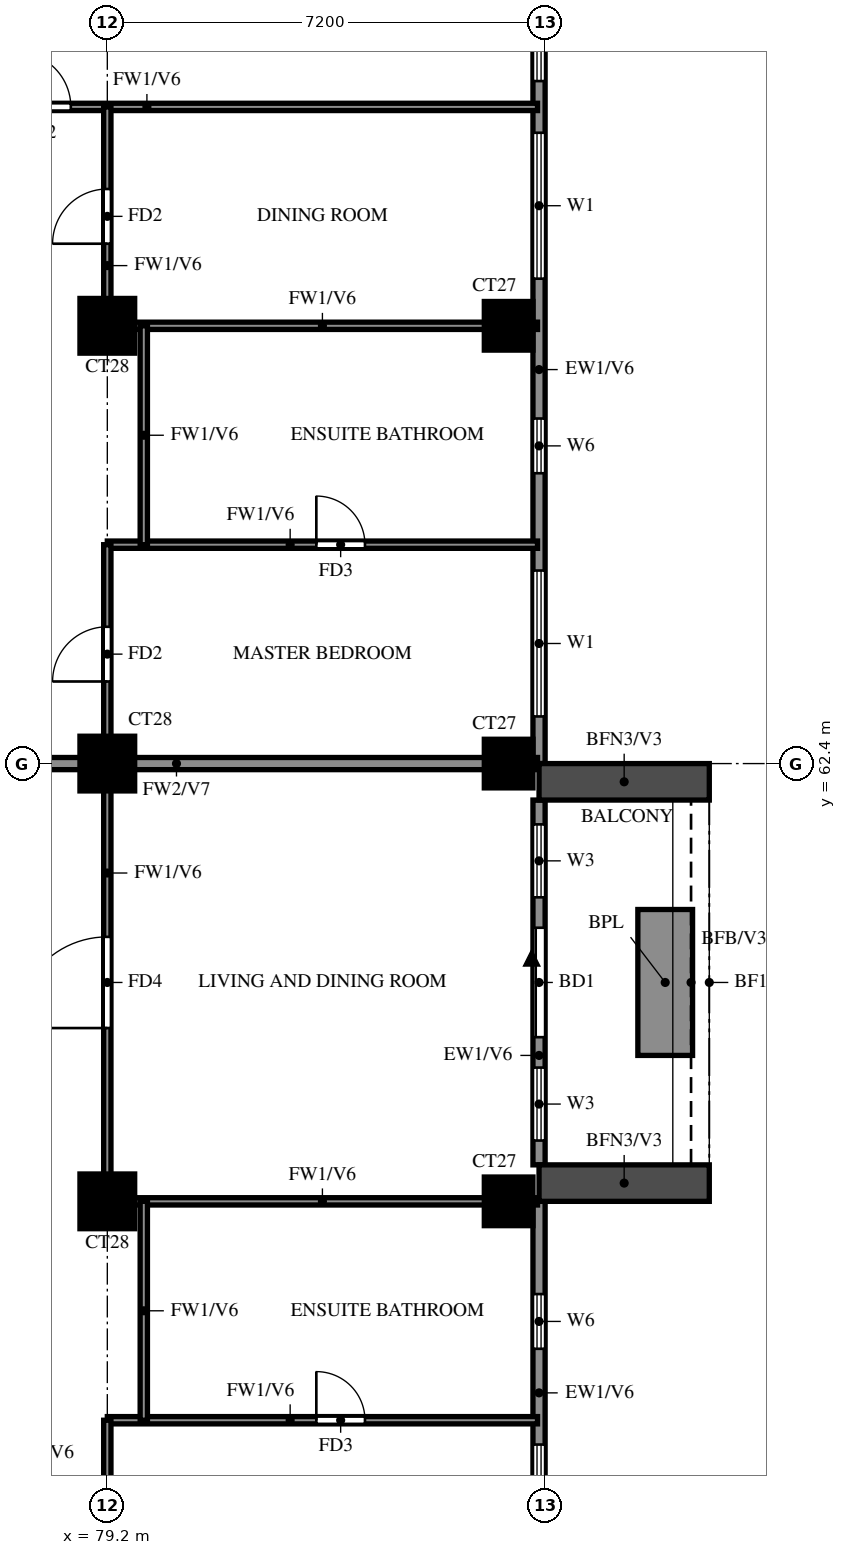
"""IFC4 building model, lengths in metres.
Left out: names, types, materials, properties, quantities, classifications, styles, units other than length and angle.
Written with IfcOpenShell. Run it as: python <this file> out.ifc"""

import sys

from ifc_helpers import new_model, si_unit, direction, frame, frame_2d, origin, origin_2d, place, context, subcontext, project, spatial, rectangle, extrude, source, transform, mapped, element, fill, save


model = new_model("IFC4")
c1 = context("Model", 3, precision=1e-05, world=origin(), true_north=direction((0.0, 1.0)))
c2 = subcontext(c1, "Body", "Model", "MODEL_VIEW")
j1 = project(units=[si_unit("LENGTHUNIT", "METRE"), si_unit("PLANEANGLEUNIT", "RADIAN")], contexts=[c1])
p1 = place(None, origin())
s1 = spatial("IfcSite", under=j1, at=p1, CompositionType="ELEMENT")
p2 = place(p1, origin())
s2 = spatial("IfcBuilding", under=s1, at=p2, CompositionType="ELEMENT")
p3 = place(p2, frame((0.0, 0.0, 202.5)))
s3 = spatial("IfcBuildingStorey", under=s2, at=p3, CompositionType="ELEMENT", Elevation=202.5)
m1 = source(origin(), c2, "Body", "SweptSolid", [
    extrude(rectangle(XDim=0.9, YDim=0.9, at=origin_2d()), origin(), (0.0, 0.0, 1.0), 3.1),
])
p4 = place(p3, frame((79.2, 55.2, 0.0), z_axis=(0.0, 0.0, 1.0), x_axis=(1.0, 0.0, 0.0)))
e1 = element("IfcColumn", 1, at=p4, inside=s3, PredefinedType="COLUMN", context=c2, shape_type="MappedRepresentation", body=[
    mapped(m1, transform((0.0, 0.0, 0.0))),
])
m2 = source(origin(), c2, "Body", "SweptSolid", [
    extrude(rectangle(XDim=0.8, YDim=0.8, at=origin_2d()), origin(), (0.0, 0.0, 1.0), 3.1),
])
p5 = place(p3, frame((85.8, 55.2, 0.0), z_axis=(0.0, 0.0, 1.0), x_axis=(1.0, 0.0, 0.0)))
e2 = element("IfcColumn", 2, at=p5, inside=s3, PredefinedType="COLUMN", context=c2, shape_type="MappedRepresentation", body=[
    mapped(m2, transform((0.0, 0.0, 0.0))),
])
p6 = place(p3, frame((79.2, 62.4, 0.0), z_axis=(0.0, 0.0, 1.0), x_axis=(1.0, 0.0, 0.0)))
e3 = element("IfcColumn", 3, at=p6, inside=s3, PredefinedType="COLUMN", context=c2, shape_type="MappedRepresentation", body=[
    mapped(m1, transform((0.0, 0.0, 0.0))),
])
p7 = place(p3, frame((85.8, 62.4, 0.0), z_axis=(0.0, 0.0, 1.0), x_axis=(1.0, 0.0, 0.0)))
e4 = element("IfcColumn", 4, at=p7, inside=s3, PredefinedType="COLUMN", context=c2, shape_type="MappedRepresentation", body=[
    mapped(m2, transform((0.0, 0.0, 0.0))),
])
p8 = place(p3, frame((79.2, 69.6, 0.0), z_axis=(0.0, 0.0, 1.0), x_axis=(1.0, 0.0, 0.0)))
e5 = element("IfcColumn", 5, at=p8, inside=s3, PredefinedType="COLUMN", context=c2, shape_type="MappedRepresentation", body=[
    mapped(m1, transform((0.0, 0.0, 0.0))),
])
p9 = place(p3, frame((85.8, 69.6, 0.0), z_axis=(0.0, 0.0, 1.0), x_axis=(1.0, 0.0, 0.0)))
e6 = element("IfcColumn", 6, at=p9, inside=s3, PredefinedType="COLUMN", context=c2, shape_type="MappedRepresentation", body=[
    mapped(m2, transform((0.0, 0.0, 0.0))),
])
p10 = place(p3, frame((86.3, 48.2, 0.0), z_axis=(0.0, 0.0, 1.0), x_axis=(0.0, 1.0, 0.0)))
e7 = element("IfcWall", 7, at=p10, inside=s3, PredefinedType="SOLIDWALL", context=c2, shape_type="SweptSolid", body=[
    extrude(rectangle(XDim=7.0, YDim=0.2, at=frame_2d((3.5, 0.0))), origin(), (0.0, 0.0, 1.0), 3.1),
])
p11 = place(p10, frame((0.6, 0.0, 0.6)))
e8 = element("IfcOpeningElement", 8, at=p11, cuts=e7, PredefinedType="OPENING", context=c2, shape_type="SweptSolid", body=[
    extrude(rectangle(XDim=2.4, YDim=2.4, at=frame_2d((1.2, 1.2))), frame((0.0, 0.11, 0.0), z_axis=(0.0, -1.0, 0.0), x_axis=(1.0, 0.0, 0.0)), (0.0, 0.0, 1.0), 0.22),
])
p12 = place(p10, frame((4.575, 0.0, 1.5)))
e9 = element("IfcOpeningElement", 9, at=p12, cuts=e7, PredefinedType="OPENING", context=c2, shape_type="SweptSolid", body=[
    extrude(rectangle(XDim=0.9, YDim=0.9, at=frame_2d((0.45, 0.45))), frame((0.0, 0.11, 0.0), z_axis=(0.0, -1.0, 0.0), x_axis=(1.0, 0.0, 0.0)), (0.0, 0.0, 1.0), 0.22),
])
p13 = place(p3, frame((86.3, 55.8, 0.0), z_axis=(0.0, 0.0, 1.0), x_axis=(0.0, 1.0, 0.0)))
e10 = element("IfcWall", 10, at=p13, inside=s3, PredefinedType="SOLIDWALL", context=c2, shape_type="SweptSolid", body=[
    extrude(rectangle(XDim=6.0, YDim=0.2, at=frame_2d((3.0, 0.0))), origin(), (0.0, 0.0, 1.0), 3.1),
])
p14 = place(p13, frame((2.1, 0.0, 0.0)))
e11 = element("IfcOpeningElement", 11, at=p14, cuts=e10, PredefinedType="OPENING", context=c2, shape_type="SweptSolid", body=[
    extrude(rectangle(XDim=1.8, YDim=2.4, at=frame_2d((0.9, 1.2))), frame((0.0, 0.11, 0.0), z_axis=(0.0, -1.0, 0.0), x_axis=(1.0, 0.0, 0.0)), (0.0, 0.0, 1.0), 0.22),
])
p15 = place(p13, frame((0.4, 0.0, 0.6)))
e12 = element("IfcOpeningElement", 12, at=p15, cuts=e10, PredefinedType="OPENING", context=c2, shape_type="SweptSolid", body=[
    extrude(rectangle(XDim=1.2, YDim=2.4, at=frame_2d((0.6, 1.2))), frame((0.0, 0.11, 0.0), z_axis=(0.0, -1.0, 0.0), x_axis=(1.0, 0.0, 0.0)), (0.0, 0.0, 1.0), 0.22),
])
p16 = place(p13, frame((4.4, 0.0, 0.6)))
e13 = element("IfcOpeningElement", 13, at=p16, cuts=e10, PredefinedType="OPENING", context=c2, shape_type="SweptSolid", body=[
    extrude(rectangle(XDim=1.2, YDim=2.4, at=frame_2d((0.6, 1.2))), frame((0.0, 0.11, 0.0), z_axis=(0.0, -1.0, 0.0), x_axis=(1.0, 0.0, 0.0)), (0.0, 0.0, 1.0), 0.22),
])
p17 = place(p3, frame((86.3, 62.4, 0.0), z_axis=(0.0, 0.0, 1.0), x_axis=(0.0, 1.0, 0.0)))
e14 = element("IfcWall", 14, at=p17, inside=s3, PredefinedType="SOLIDWALL", context=c2, shape_type="SweptSolid", body=[
    extrude(rectangle(XDim=14.4, YDim=0.2, at=frame_2d((7.2, 0.0))), origin(), (0.0, 0.0, 1.0), 3.1),
])
p18 = place(p17, frame((0.775, 0.0, 0.6)))
e15 = element("IfcOpeningElement", 15, at=p18, cuts=e14, PredefinedType="OPENING", context=c2, shape_type="SweptSolid", body=[
    extrude(rectangle(XDim=2.4, YDim=2.4, at=frame_2d((1.2, 1.2))), frame((0.0, 0.11, 0.0), z_axis=(0.0, -1.0, 0.0), x_axis=(1.0, 0.0, 0.0)), (0.0, 0.0, 1.0), 0.22),
])
p19 = place(p17, frame((4.775, 0.0, 1.5)))
e16 = element("IfcOpeningElement", 16, at=p19, cuts=e14, PredefinedType="OPENING", context=c2, shape_type="SweptSolid", body=[
    extrude(rectangle(XDim=0.9, YDim=0.9, at=frame_2d((0.45, 0.45))), frame((0.0, 0.11, 0.0), z_axis=(0.0, -1.0, 0.0), x_axis=(1.0, 0.0, 0.0)), (0.0, 0.0, 1.0), 0.22),
])
p20 = place(p17, frame((7.975, 0.0, 0.6)))
e17 = element("IfcOpeningElement", 17, at=p20, cuts=e14, PredefinedType="OPENING", context=c2, shape_type="SweptSolid", body=[
    extrude(rectangle(XDim=2.4, YDim=2.4, at=frame_2d((1.2, 1.2))), frame((0.0, 0.11, 0.0), z_axis=(0.0, -1.0, 0.0), x_axis=(1.0, 0.0, 0.0)), (0.0, 0.0, 1.0), 0.22),
])
p21 = place(p17, frame((11.225, 0.0, 0.6)))
e18 = element("IfcOpeningElement", 18, at=p21, cuts=e14, PredefinedType="OPENING", context=c2, shape_type="SweptSolid", body=[
    extrude(rectangle(XDim=2.4, YDim=2.4, at=frame_2d((1.2, 1.2))), frame((0.0, 0.11, 0.0), z_axis=(0.0, -1.0, 0.0), x_axis=(1.0, 0.0, 0.0)), (0.0, 0.0, 1.0), 0.22),
])
for number, where, z_axis, x_axis in (
    (19, (86.3, 55.5, 0.0), (0.0, 0.0, 1.0), (1.0, 0.0, 0.0)),
    (20, (86.3, 62.1, 0.0), (0.0, 0.0, 1.0), (1.0, 0.0, 0.0)),
):
    element("IfcWall", number, at=place(p3, frame(where, z_axis=z_axis, x_axis=x_axis)), inside=s3, PredefinedType="SOLIDWALL", context=c2, shape_type="SweptSolid", body=[
        extrude(rectangle(XDim=2.8, YDim=0.6, at=frame_2d((1.4, 0.0))), origin(), (0.0, 0.0, 1.0), 2.75),
    ])
p22 = place(p3, frame((88.375, 57.6, 0.0), z_axis=(0.0, 0.0, 1.0), x_axis=(0.0, 1.0, 0.0)))
e21 = element("IfcWall", 21, at=p22, inside=s3, PredefinedType="SOLIDWALL", context=c2, shape_type="SweptSolid", body=[
    extrude(rectangle(XDim=2.4, YDim=0.9, at=frame_2d((1.2, 0.0))), origin(), (0.0, 0.0, 1.0), 0.9),
])
p23 = place(p3, frame((74.4, 62.4, 0.0), z_axis=(0.0, 0.0, 1.0), x_axis=(1.0, 0.0, 0.0)))
e22 = element("IfcWall", 22, at=p23, inside=s3, PredefinedType="SOLIDWALL", context=c2, shape_type="SweptSolid", body=[
    extrude(rectangle(XDim=11.875, YDim=0.2, at=frame_2d((5.938, 0.0))), origin(), (0.0, 0.0, 1.0), 3.1),
])
p24 = place(p3, frame((79.2, 51.6, 0.0), z_axis=(0.0, 0.0, 1.0), x_axis=(1.0, 0.0, 0.0)))
e23 = element("IfcWall", 23, at=p24, inside=s3, PredefinedType="PARTITIONING", context=c2, shape_type="SweptSolid", body=[
    extrude(rectangle(XDim=7.075, YDim=0.12, at=frame_2d((3.538, 0.0))), origin(), (0.0, 0.0, 1.0), 3.1),
])
p25 = place(p24, frame((3.438, 0.0, 0.0)))
e24 = element("IfcOpeningElement", 24, at=p25, cuts=e23, PredefinedType="OPENING", context=c2, shape_type="SweptSolid", body=[
    extrude(rectangle(XDim=0.8, YDim=2.1, at=frame_2d((0.4, 1.05))), frame((0.0, 0.07, 0.0), z_axis=(0.0, -1.0, 0.0), x_axis=(1.0, 0.0, 0.0)), (0.0, 0.0, 1.0), 0.14),
])
p26 = place(p3, frame((79.2, 55.2, 0.0), z_axis=(0.0, 0.0, 1.0), x_axis=(1.0, 0.0, 0.0)))
e25 = element("IfcWall", 25, at=p26, inside=s3, PredefinedType="PARTITIONING", context=c2, shape_type="SweptSolid", body=[
    extrude(rectangle(XDim=7.075, YDim=0.12, at=frame_2d((3.538, 0.0))), origin(), (0.0, 0.0, 1.0), 3.1),
])
p27 = place(p3, frame((79.2, 66.0, 0.0), z_axis=(0.0, 0.0, 1.0), x_axis=(1.0, 0.0, 0.0)))
e26 = element("IfcWall", 26, at=p27, inside=s3, PredefinedType="PARTITIONING", context=c2, shape_type="SweptSolid", body=[
    extrude(rectangle(XDim=7.075, YDim=0.12, at=frame_2d((3.538, 0.0))), origin(), (0.0, 0.0, 1.0), 3.1),
])
p28 = place(p27, frame((3.438, 0.0, 0.0)))
e27 = element("IfcOpeningElement", 27, at=p28, cuts=e26, PredefinedType="OPENING", context=c2, shape_type="SweptSolid", body=[
    extrude(rectangle(XDim=0.8, YDim=2.1, at=frame_2d((0.4, 1.05))), frame((0.0, 0.07, 0.0), z_axis=(0.0, -1.0, 0.0), x_axis=(1.0, 0.0, 0.0)), (0.0, 0.0, 1.0), 0.14),
])
p29 = place(p3, frame((79.2, 69.6, 0.0), z_axis=(0.0, 0.0, 1.0), x_axis=(1.0, 0.0, 0.0)))
e28 = element("IfcWall", 28, at=p29, inside=s3, PredefinedType="PARTITIONING", context=c2, shape_type="SweptSolid", body=[
    extrude(rectangle(XDim=7.075, YDim=0.12, at=frame_2d((3.538, 0.0))), origin(), (0.0, 0.0, 1.0), 3.1),
])
p30 = place(p3, frame((72.0, 73.2, 0.0), z_axis=(0.0, 0.0, 1.0), x_axis=(1.0, 0.0, 0.0)))
e29 = element("IfcWall", 29, at=p30, inside=s3, PredefinedType="PARTITIONING", context=c2, shape_type="SweptSolid", body=[
    extrude(rectangle(XDim=14.275, YDim=0.12, at=frame_2d((7.137, 0.0))), origin(), (0.0, 0.0, 1.0), 3.1),
])
p31 = place(p30, frame((5.7, 0.0, 0.0)))
e30 = element("IfcOpeningElement", 30, at=p31, cuts=e29, PredefinedType="OPENING", context=c2, shape_type="SweptSolid", body=[
    extrude(rectangle(XDim=0.9, YDim=2.1, at=frame_2d((0.45, 1.05))), frame((0.0, 0.07, 0.0), z_axis=(0.0, -1.0, 0.0), x_axis=(1.0, 0.0, 0.0)), (0.0, 0.0, 1.0), 0.14),
])
p32 = place(p3, frame((79.2, 48.125, 0.0), z_axis=(0.0, 0.0, 1.0), x_axis=(0.0, 1.0, 0.0)))
e31 = element("IfcWall", 31, at=p32, inside=s3, PredefinedType="PARTITIONING", context=c2, shape_type="SweptSolid", body=[
    extrude(rectangle(XDim=3.475, YDim=0.12, at=frame_2d((1.738, 0.0))), origin(), (0.0, 0.0, 1.0), 3.1),
])
p33 = place(p32, frame((1.288, 0.0, 0.0)))
e32 = element("IfcOpeningElement", 32, at=p33, cuts=e31, PredefinedType="OPENING", context=c2, shape_type="SweptSolid", body=[
    extrude(rectangle(XDim=0.9, YDim=2.1, at=frame_2d((0.45, 1.05))), frame((0.0, 0.07, 0.0), z_axis=(0.0, -1.0, 0.0), x_axis=(1.0, 0.0, 0.0)), (0.0, 0.0, 1.0), 0.14),
])
p34 = place(p3, frame((79.2, 55.2, 0.0), z_axis=(0.0, 0.0, 1.0), x_axis=(0.0, 1.0, 0.0)))
e33 = element("IfcWall", 33, at=p34, inside=s3, PredefinedType="PARTITIONING", context=c2, shape_type="SweptSolid", body=[
    extrude(rectangle(XDim=10.8, YDim=0.12, at=frame_2d((5.4, 0.0))), origin(), (0.0, 0.0, 1.0), 3.1),
])
p35 = place(p34, frame((2.85, 0.0, 0.0)))
e34 = element("IfcOpeningElement", 34, at=p35, cuts=e33, PredefinedType="OPENING", context=c2, shape_type="SweptSolid", body=[
    extrude(rectangle(XDim=1.5, YDim=2.1, at=frame_2d((0.75, 1.05))), frame((0.0, 0.07, 0.0), z_axis=(0.0, -1.0, 0.0), x_axis=(1.0, 0.0, 0.0)), (0.0, 0.0, 1.0), 0.14),
])
p36 = place(p34, frame((8.55, 0.0, 0.0)))
e35 = element("IfcOpeningElement", 35, at=p36, cuts=e33, PredefinedType="OPENING", context=c2, shape_type="SweptSolid", body=[
    extrude(rectangle(XDim=0.9, YDim=2.1, at=frame_2d((0.45, 1.05))), frame((0.0, 0.07, 0.0), z_axis=(0.0, -1.0, 0.0), x_axis=(1.0, 0.0, 0.0)), (0.0, 0.0, 1.0), 0.14),
])
p37 = place(p3, frame((79.2, 69.6, 0.0), z_axis=(0.0, 0.0, 1.0), x_axis=(0.0, 1.0, 0.0)))
e36 = element("IfcWall", 36, at=p37, inside=s3, PredefinedType="PARTITIONING", context=c2, shape_type="SweptSolid", body=[
    extrude(rectangle(XDim=3.6, YDim=0.12, at=frame_2d((1.8, 0.0))), origin(), (0.0, 0.0, 1.0), 3.1),
])
p38 = place(p37, frame((1.35, 0.0, 0.0)))
e37 = element("IfcOpeningElement", 37, at=p38, cuts=e36, PredefinedType="OPENING", context=c2, shape_type="SweptSolid", body=[
    extrude(rectangle(XDim=0.9, YDim=2.1, at=frame_2d((0.45, 1.05))), frame((0.0, 0.07, 0.0), z_axis=(0.0, -1.0, 0.0), x_axis=(1.0, 0.0, 0.0)), (0.0, 0.0, 1.0), 0.14),
])
p39 = place(p3, frame((79.8, 51.6, 0.0), z_axis=(0.0, 0.0, 1.0), x_axis=(0.0, 1.0, 0.0)))
e38 = element("IfcWall", 38, at=p39, inside=s3, PredefinedType="PARTITIONING", context=c2, shape_type="SweptSolid", body=[
    extrude(rectangle(XDim=3.6, YDim=0.12, at=frame_2d((1.8, 0.0))), origin(), (0.0, 0.0, 1.0), 3.1),
])
p40 = place(p3, frame((79.8, 66.0, 0.0), z_axis=(0.0, 0.0, 1.0), x_axis=(0.0, 1.0, 0.0)))
e39 = element("IfcWall", 39, at=p40, inside=s3, PredefinedType="PARTITIONING", context=c2, shape_type="SweptSolid", body=[
    extrude(rectangle(XDim=3.6, YDim=0.12, at=frame_2d((1.8, 0.0))), origin(), (0.0, 0.0, 1.0), 3.1),
])
p41 = place(p11, origin())
e40 = element("IfcWindow", 40, at=p41, inside=s3, PartitioningType="DOUBLE_PANEL_VERTICAL", PredefinedType="WINDOW", context=c2, shape_type="SweptSolid", body=[
    extrude(rectangle(XDim=2.4, YDim=2.4, at=frame_2d((1.2, 1.2))), frame((0.0, 0.03, 0.0), z_axis=(0.0, -1.0, 0.0), x_axis=(1.0, 0.0, 0.0)), (0.0, 0.0, 1.0), 0.06),
])
fill(e8, e40)
p42 = place(p12, origin())
e41 = element("IfcWindow", 41, at=p42, inside=s3, PartitioningType="SINGLE_PANEL", PredefinedType="WINDOW", context=c2, shape_type="SweptSolid", body=[
    extrude(rectangle(XDim=0.9, YDim=0.9, at=frame_2d((0.45, 0.45))), frame((0.0, 0.03, 0.0), z_axis=(0.0, -1.0, 0.0), x_axis=(1.0, 0.0, 0.0)), (0.0, 0.0, 1.0), 0.06),
])
fill(e9, e41)
p43 = place(p14, origin())
e42 = element("IfcDoor", 42, at=p43, inside=s3, OperationType="DOUBLE_DOOR_SLIDING", PredefinedType="DOOR", context=c2, shape_type="SweptSolid", body=[
    extrude(rectangle(XDim=1.8, YDim=2.4, at=frame_2d((0.9, 1.2))), frame((0.0, 0.025, 0.0), z_axis=(0.0, -1.0, 0.0), x_axis=(1.0, 0.0, 0.0)), (0.0, 0.0, 1.0), 0.05),
])
fill(e11, e42)
p44 = place(p15, origin())
e43 = element("IfcWindow", 43, at=p44, inside=s3, PartitioningType="SINGLE_PANEL", PredefinedType="WINDOW", context=c2, shape_type="SweptSolid", body=[
    extrude(rectangle(XDim=1.2, YDim=2.4, at=frame_2d((0.6, 1.2))), frame((0.0, 0.03, 0.0), z_axis=(0.0, -1.0, 0.0), x_axis=(1.0, 0.0, 0.0)), (0.0, 0.0, 1.0), 0.06),
])
fill(e12, e43)
p45 = place(p16, origin())
e44 = element("IfcWindow", 44, at=p45, inside=s3, PartitioningType="SINGLE_PANEL", PredefinedType="WINDOW", context=c2, shape_type="SweptSolid", body=[
    extrude(rectangle(XDim=1.2, YDim=2.4, at=frame_2d((0.6, 1.2))), frame((0.0, 0.03, 0.0), z_axis=(0.0, -1.0, 0.0), x_axis=(1.0, 0.0, 0.0)), (0.0, 0.0, 1.0), 0.06),
])
fill(e13, e44)
p46 = place(p18, origin())
e45 = element("IfcWindow", 45, at=p46, inside=s3, PartitioningType="DOUBLE_PANEL_VERTICAL", PredefinedType="WINDOW", context=c2, shape_type="SweptSolid", body=[
    extrude(rectangle(XDim=2.4, YDim=2.4, at=frame_2d((1.2, 1.2))), frame((0.0, 0.03, 0.0), z_axis=(0.0, -1.0, 0.0), x_axis=(1.0, 0.0, 0.0)), (0.0, 0.0, 1.0), 0.06),
])
fill(e15, e45)
p47 = place(p19, origin())
e46 = element("IfcWindow", 46, at=p47, inside=s3, PartitioningType="SINGLE_PANEL", PredefinedType="WINDOW", context=c2, shape_type="SweptSolid", body=[
    extrude(rectangle(XDim=0.9, YDim=0.9, at=frame_2d((0.45, 0.45))), frame((0.0, 0.03, 0.0), z_axis=(0.0, -1.0, 0.0), x_axis=(1.0, 0.0, 0.0)), (0.0, 0.0, 1.0), 0.06),
])
fill(e16, e46)
p48 = place(p20, origin())
e47 = element("IfcWindow", 47, at=p48, inside=s3, PartitioningType="DOUBLE_PANEL_VERTICAL", PredefinedType="WINDOW", context=c2, shape_type="SweptSolid", body=[
    extrude(rectangle(XDim=2.4, YDim=2.4, at=frame_2d((1.2, 1.2))), frame((0.0, 0.03, 0.0), z_axis=(0.0, -1.0, 0.0), x_axis=(1.0, 0.0, 0.0)), (0.0, 0.0, 1.0), 0.06),
])
fill(e17, e47)
p49 = place(p21, origin())
e48 = element("IfcWindow", 48, at=p49, inside=s3, PartitioningType="DOUBLE_PANEL_VERTICAL", PredefinedType="WINDOW", context=c2, shape_type="SweptSolid", body=[
    extrude(rectangle(XDim=2.4, YDim=2.4, at=frame_2d((1.2, 1.2))), frame((0.0, 0.03, 0.0), z_axis=(0.0, -1.0, 0.0), x_axis=(1.0, 0.0, 0.0)), (0.0, 0.0, 1.0), 0.06),
])
fill(e18, e48)
p50 = place(p25, origin())
e49 = element("IfcDoor", 49, at=p50, inside=s3, OperationType="SINGLE_SWING_LEFT", PredefinedType="DOOR", context=c2, shape_type="SweptSolid", body=[
    extrude(rectangle(XDim=0.8, YDim=2.1, at=frame_2d((0.4, 1.05))), frame((0.0, 0.025, 0.0), z_axis=(0.0, -1.0, 0.0), x_axis=(1.0, 0.0, 0.0)), (0.0, 0.0, 1.0), 0.05),
])
fill(e24, e49)
p51 = place(p35, origin())
e50 = element("IfcDoor", 50, at=p51, inside=s3, OperationType="SINGLE_SWING_RIGHT", PredefinedType="DOOR", context=c2, shape_type="SweptSolid", body=[
    extrude(rectangle(XDim=1.5, YDim=2.1, at=frame_2d((0.75, 1.05))), frame((0.0, 0.025, 0.0), z_axis=(0.0, -1.0, 0.0), x_axis=(1.0, 0.0, 0.0)), (0.0, 0.0, 1.0), 0.05),
])
fill(e34, e50)
p52 = place(p36, origin())
e51 = element("IfcDoor", 51, at=p52, inside=s3, OperationType="SINGLE_SWING_RIGHT", PredefinedType="DOOR", context=c2, shape_type="SweptSolid", body=[
    extrude(rectangle(XDim=0.9, YDim=2.1, at=frame_2d((0.45, 1.05))), frame((0.0, 0.025, 0.0), z_axis=(0.0, -1.0, 0.0), x_axis=(1.0, 0.0, 0.0)), (0.0, 0.0, 1.0), 0.05),
])
fill(e35, e51)
p53 = place(p28, origin())
e52 = element("IfcDoor", 52, at=p53, inside=s3, OperationType="SINGLE_SWING_LEFT", PredefinedType="DOOR", context=c2, shape_type="SweptSolid", body=[
    extrude(rectangle(XDim=0.8, YDim=2.1, at=frame_2d((0.4, 1.05))), frame((0.0, 0.025, 0.0), z_axis=(0.0, -1.0, 0.0), x_axis=(1.0, 0.0, 0.0)), (0.0, 0.0, 1.0), 0.05),
])
fill(e27, e52)
p54 = place(p38, origin())
e53 = element("IfcDoor", 53, at=p54, inside=s3, OperationType="SINGLE_SWING_LEFT", PredefinedType="DOOR", context=c2, shape_type="SweptSolid", body=[
    extrude(rectangle(XDim=0.9, YDim=2.1, at=frame_2d((0.45, 1.05))), frame((0.0, 0.025, 0.0), z_axis=(0.0, -1.0, 0.0), x_axis=(1.0, 0.0, 0.0)), (0.0, 0.0, 1.0), 0.05),
])
fill(e37, e53)
p55 = place(p31, origin())
e54 = element("IfcDoor", 54, at=p55, inside=s3, OperationType="SINGLE_SWING_RIGHT", PredefinedType="DOOR", context=c2, shape_type="SweptSolid", body=[
    extrude(rectangle(XDim=0.9, YDim=2.1, at=frame_2d((0.45, 1.05))), frame((0.0, 0.025, 0.0), z_axis=(0.0, -1.0, 0.0), x_axis=(1.0, 0.0, 0.0)), (0.0, 0.0, 1.0), 0.05),
])
fill(e30, e54)
save(model, sys.argv[1])
